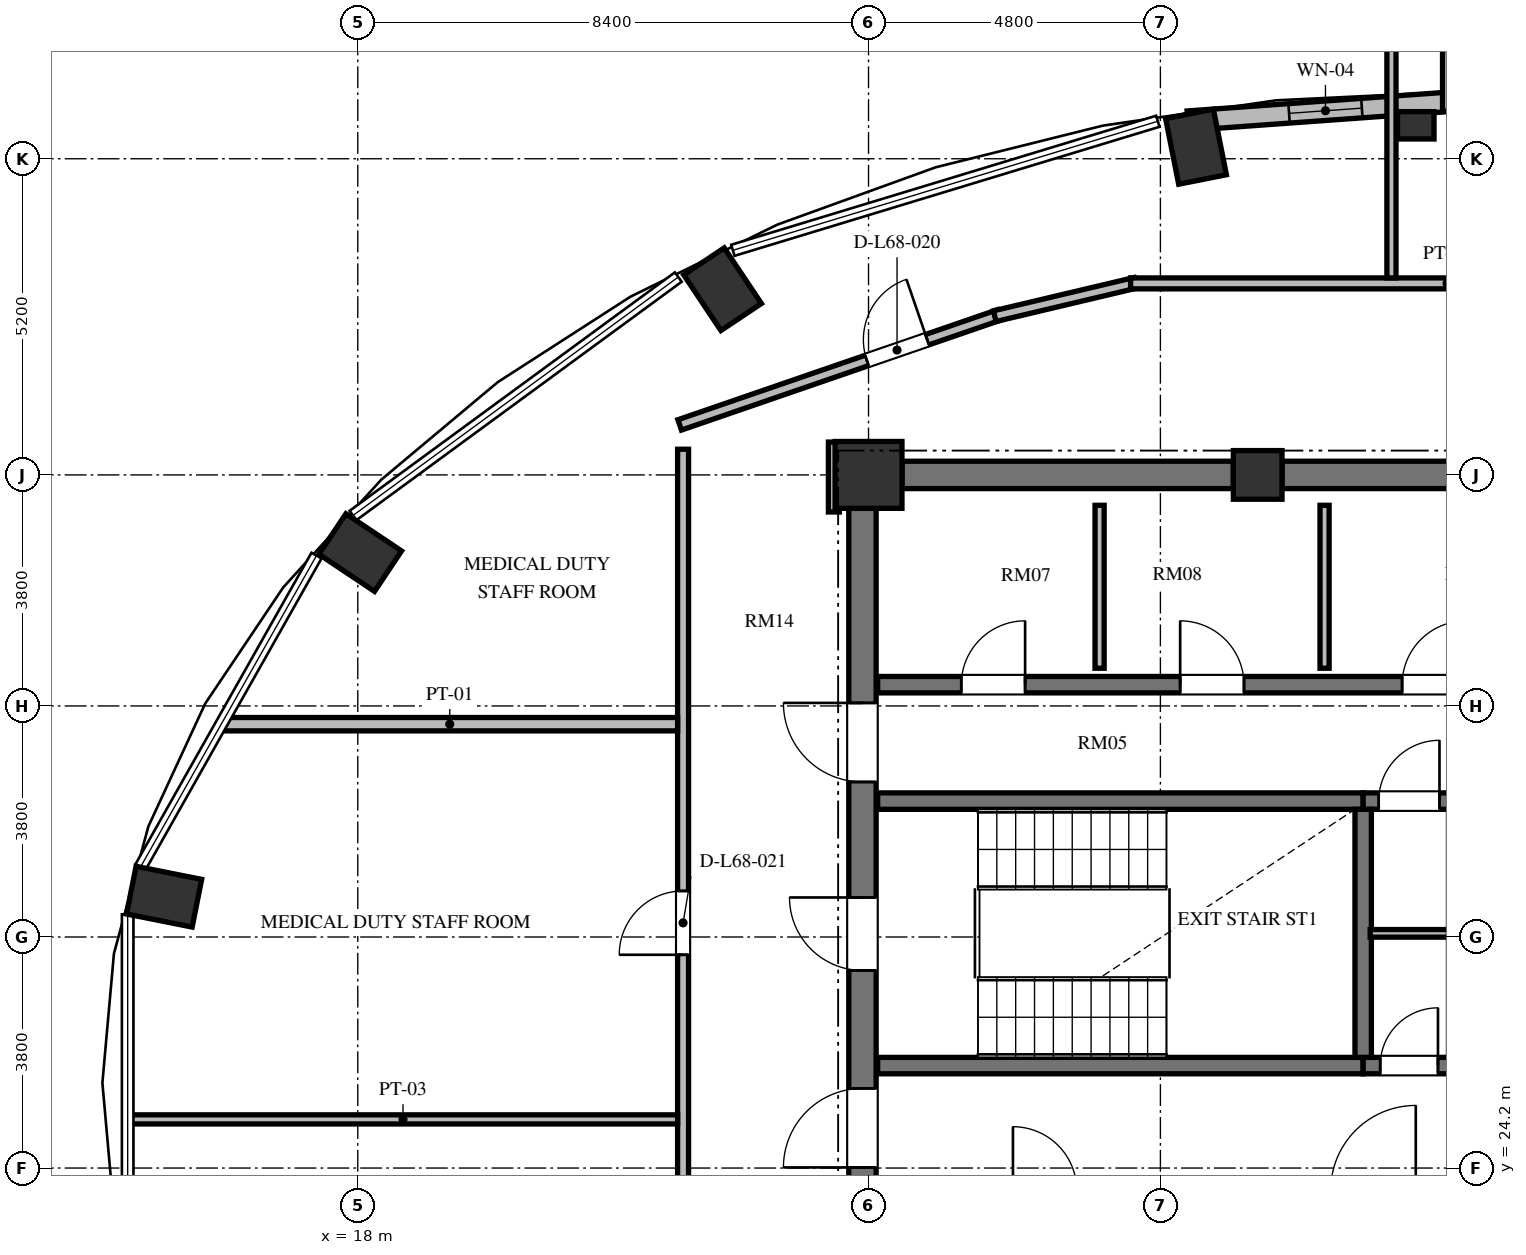
"""IFC4 building model, lengths in metres.
Left out: names, types, materials, properties, quantities, classifications, styles, units other than length and angle.
Written with IfcOpenShell. Run it as: python <this file> out.ifc"""

import sys

from ifc_helpers import new_model, si_unit, direction, frame, frame_2d, origin, origin_2d, place, context, subcontext, project, spatial, rectangle, extrude, element, fill, save


model = new_model("IFC4")
c1 = context("Model", 3, precision=1e-05, world=origin(), true_north=direction((0.0, 1.0)))
c2 = subcontext(c1, "Body", "Model", "MODEL_VIEW")
j1 = project(units=[si_unit("LENGTHUNIT", "METRE"), si_unit("PLANEANGLEUNIT", "RADIAN")], contexts=[c1])
p1 = place(None, origin())
s1 = spatial("IfcSite", under=j1, at=p1, CompositionType="ELEMENT")
p2 = place(p1, origin())
s2 = spatial("IfcBuilding", under=s1, at=p2, CompositionType="ELEMENT")
p3 = place(p2, frame((0.0, 0.0, 262.32)))
s3 = spatial("IfcBuildingStorey", under=s2, at=p3, CompositionType="ELEMENT", Elevation=262.32)
for number, where, z_axis, x_axis in (
    (1, (31.786, 40.998, 0.0), (0.0, 0.0, 1.0), (-0.195, 0.981, 0.0)),
    (2, (24.0, 38.654, 0.0), (0.0, 0.0, 1.0), (-0.556, 0.831, 0.0)),
    (3, (18.04, 34.323, 0.0), (0.0, 0.0, 1.0), (-0.831, 0.556, 0.0)),
    (4, (14.815, 28.663, 0.0), (0.0, 0.0, 1.0), (-0.981, 0.195, 0.0)),
):
    element("IfcColumn", number, at=place(p3, frame(where, z_axis=z_axis, x_axis=x_axis)), inside=s3, PredefinedType="COLUMN", context=c2, shape_type="SweptSolid", body=[
        extrude(rectangle(XDim=1.1, YDim=0.8, at=origin_2d()), origin(), (0.0, 0.0, 1.0), 3.648),
    ])
p4 = place(p3, frame((32.8, 35.6, 0.0), z_axis=(0.0, 0.0, 1.0), x_axis=(1.0, 0.0, 0.0)))
e5 = element("IfcColumn", 5, at=p4, inside=s3, PredefinedType="COLUMN", context=c2, shape_type="SweptSolid", body=[
    extrude(rectangle(XDim=0.8, YDim=0.8, at=origin_2d()), origin(), (0.0, 0.0, 1.0), 3.648),
])
p5 = place(p3, frame((26.4, 35.6, 0.0), z_axis=(0.0, 0.0, 1.0), x_axis=(1.0, 0.0, 0.0)))
e6 = element("IfcColumn", 6, at=p5, inside=s3, PredefinedType="COLUMN", context=c2, shape_type="SweptSolid", body=[
    extrude(rectangle(XDim=1.1, YDim=1.1, at=origin_2d()), origin(), (0.0, 0.0, 1.0), 3.648),
])
p6 = place(p3, frame((35.4, 41.35, 0.0), z_axis=(0.0, 0.0, 1.0), x_axis=(1.0, 0.0, 0.0)))
e7 = element("IfcColumn", 7, at=p6, inside=s3, PredefinedType="PILASTER", context=c2, shape_type="SweptSolid", body=[
    extrude(rectangle(XDim=0.6, YDim=0.45, at=origin_2d()), origin(), (0.0, 0.0, 1.0), 3.648),
])
p7 = place(p3, frame((26.3, 20.95, 0.0), z_axis=(0.0, 0.0, 1.0), x_axis=(0.0, 1.0, 0.0)))
e8 = element("IfcWall", 8, at=p7, inside=s3, PredefinedType="SHEAR", context=c2, shape_type="SweptSolid", body=[
    extrude(rectangle(XDim=14.1, YDim=0.45, at=frame_2d((7.05, 0.0))), origin(), (0.0, 0.0, 1.0), 3.648),
])
p8 = place(p7, frame((6.5, 0.0, 0.0)))
e9 = element("IfcOpeningElement", 9, at=p8, cuts=e8, PredefinedType="OPENING", context=c2, shape_type="SweptSolid", body=[
    extrude(rectangle(XDim=1.2, YDim=2.15, at=frame_2d((0.6, 1.075))), frame((0.0, 0.235, 0.0), z_axis=(0.0, -1.0, 0.0), x_axis=(1.0, 0.0, 0.0)), (0.0, 0.0, 1.0), 0.47),
])
p9 = place(p7, frame((9.6, 0.0, 0.0)))
e10 = element("IfcOpeningElement", 10, at=p9, cuts=e8, PredefinedType="OPENING", context=c2, shape_type="SweptSolid", body=[
    extrude(rectangle(XDim=1.3, YDim=2.2, at=frame_2d((0.65, 1.1))), frame((0.0, 0.235, 0.0), z_axis=(0.0, -1.0, 0.0), x_axis=(1.0, 0.0, 0.0)), (0.0, 0.0, 1.0), 0.47),
])
p10 = place(p7, frame((3.26, 0.0, 0.0)))
e11 = element("IfcOpeningElement", 11, at=p10, cuts=e8, PredefinedType="OPENING", context=c2, shape_type="SweptSolid", body=[
    extrude(rectangle(XDim=1.3, YDim=2.2, at=frame_2d((0.65, 1.1))), frame((0.0, 0.235, 0.0), z_axis=(0.0, -1.0, 0.0), x_axis=(1.0, 0.0, 0.0)), (0.0, 0.0, 1.0), 0.47),
])
p11 = place(p3, frame((26.95, 35.6, 0.0), z_axis=(0.0, 0.0, 1.0), x_axis=(1.0, 0.0, 0.0)))
e12 = element("IfcWall", 12, at=p11, inside=s3, PredefinedType="SHEAR", context=c2, shape_type="SweptSolid", body=[
    extrude(rectangle(XDim=5.45, YDim=0.45, at=frame_2d((2.725, 0.0))), origin(), (0.0, 0.0, 1.0), 3.648),
])
p12 = place(p3, frame((33.2, 35.6, 0.0), z_axis=(0.0, 0.0, 1.0), x_axis=(1.0, 0.0, 0.0)))
e13 = element("IfcWall", 13, at=p12, inside=s3, PredefinedType="SHEAR", context=c2, shape_type="SweptSolid", body=[
    extrude(rectangle(XDim=5.6, YDim=0.45, at=frame_2d((2.8, 0.0))), origin(), (0.0, 0.0, 1.0), 3.648),
])
p13 = place(p3, frame((36.179, 41.753, 0.0), z_axis=(0.0, 0.0, 1.0), x_axis=(-0.997408782787, -0.071942477163, 0.0)))
e14 = element("IfcWall", 14, at=p13, inside=s3, PredefinedType="SOLIDWALL", context=c2, shape_type="SweptSolid", body=[
    extrude(rectangle(XDim=4.541, YDim=0.32, at=frame_2d((2.27, 0.0))), origin(), (0.0, 0.0, 1.0), 3.448),
])
p14 = place(p13, frame((1.67, 0.0, 0.85)))
e15 = element("IfcOpeningElement", 15, at=p14, cuts=e14, PredefinedType="OPENING", context=c2, shape_type="SweptSolid", body=[
    extrude(rectangle(XDim=1.2, YDim=1.8, at=frame_2d((0.6, 0.9))), frame((0.0, 0.17, 0.0), z_axis=(0.0, -1.0, 0.0), x_axis=(1.0, 0.0, 0.0)), (0.0, 0.0, 1.0), 0.34),
])
p15 = place(p3, frame((36.0, 46.7, 0.0), z_axis=(0.0, 0.0, 1.0), x_axis=(0.0, -1.0, 0.0)))
e16 = element("IfcWall", 16, at=p15, inside=s3, PredefinedType="SOLIDWALL", context=c2, shape_type="SweptSolid", body=[
    extrude(rectangle(XDim=5.12, YDim=0.32, at=frame_2d((2.56, 0.0))), origin(), (0.0, 0.0, 1.0), 3.448),
])
p16 = place(p15, frame((1.36, 0.0, 0.84)))
e17 = element("IfcOpeningElement", 17, at=p16, cuts=e16, PredefinedType="OPENING", context=c2, shape_type="SweptSolid", body=[
    extrude(rectangle(XDim=2.4, YDim=2.04, at=frame_2d((1.2, 1.02))), frame((0.0, 0.17, 0.0), z_axis=(0.0, -1.0, 0.0), x_axis=(1.0, 0.0, 0.0)), (0.0, 0.0, 1.0), 0.34),
])
p17 = place(p3, frame((26.55, 30.235, 0.0), z_axis=(0.0, 0.0, 1.0), x_axis=(1.0, 0.0, 0.0)))
e18 = element("IfcWall", 18, at=p17, inside=s3, PredefinedType="SHEAR", context=c2, shape_type="SweptSolid", body=[
    extrude(rectangle(XDim=7.985, YDim=0.27, at=frame_2d((3.992, 0.0))), origin(), (0.0, 0.0, 1.0), 3.648),
])
p18 = place(p3, frame((34.535, 30.235, 0.0), z_axis=(0.0, 0.0, 1.0), x_axis=(1.0, 0.0, 0.0)))
e19 = element("IfcWall", 19, at=p18, inside=s3, PredefinedType="SHEAR", context=c2, shape_type="SweptSolid", body=[
    extrude(rectangle(XDim=2.93, YDim=0.27, at=frame_2d((1.465, 0.0))), origin(), (0.0, 0.0, 1.0), 3.648),
])
p19 = place(p18, frame((0.255, 0.0, 0.0)))
e20 = element("IfcOpeningElement", 20, at=p19, cuts=e19, PredefinedType="OPENING", context=c2, shape_type="SweptSolid", body=[
    extrude(rectangle(XDim=1.0, YDim=2.1, at=frame_2d((0.5, 1.05))), frame((0.0, 0.145, 0.0), z_axis=(0.0, -1.0, 0.0), x_axis=(1.0, 0.0, 0.0)), (0.0, 0.0, 1.0), 0.29),
])
p20 = place(p18, frame((1.7, 0.0, 0.0)))
e21 = element("IfcOpeningElement", 21, at=p20, cuts=e19, PredefinedType="OPENING", context=c2, shape_type="SweptSolid", body=[
    extrude(rectangle(XDim=0.95, YDim=2.1, at=frame_2d((0.475, 1.05))), frame((0.0, 0.145, 0.0), z_axis=(0.0, -1.0, 0.0), x_axis=(1.0, 0.0, 0.0)), (0.0, 0.0, 1.0), 0.29),
])
p21 = place(p3, frame((26.55, 25.885, 0.0), z_axis=(0.0, 0.0, 1.0), x_axis=(1.0, 0.0, 0.0)))
e22 = element("IfcWall", 22, at=p21, inside=s3, PredefinedType="SHEAR", context=c2, shape_type="SweptSolid", body=[
    extrude(rectangle(XDim=7.985, YDim=0.27, at=frame_2d((3.992, 0.0))), origin(), (0.0, 0.0, 1.0), 3.648),
])
p22 = place(p3, frame((34.535, 25.885, 0.0), z_axis=(0.0, 0.0, 1.0), x_axis=(1.0, 0.0, 0.0)))
e23 = element("IfcWall", 23, at=p22, inside=s3, PredefinedType="SHEAR", context=c2, shape_type="SweptSolid", body=[
    extrude(rectangle(XDim=2.93, YDim=0.27, at=frame_2d((1.465, 0.0))), origin(), (0.0, 0.0, 1.0), 3.648),
])
p23 = place(p22, frame((0.28, 0.0, 0.0)))
e24 = element("IfcOpeningElement", 24, at=p23, cuts=e23, PredefinedType="OPENING", context=c2, shape_type="SweptSolid", body=[
    extrude(rectangle(XDim=0.95, YDim=2.1, at=frame_2d((0.475, 1.05))), frame((0.0, 0.145, 0.0), z_axis=(0.0, -1.0, 0.0), x_axis=(1.0, 0.0, 0.0)), (0.0, 0.0, 1.0), 0.29),
])
p24 = place(p22, frame((1.7, 0.0, 0.0)))
e25 = element("IfcOpeningElement", 25, at=p24, cuts=e23, PredefinedType="OPENING", context=c2, shape_type="SweptSolid", body=[
    extrude(rectangle(XDim=0.95, YDim=2.1, at=frame_2d((0.475, 1.05))), frame((0.0, 0.145, 0.0), z_axis=(0.0, -1.0, 0.0), x_axis=(1.0, 0.0, 0.0)), (0.0, 0.0, 1.0), 0.29),
])
p25 = place(p3, frame((34.535, 26.02, 0.0), z_axis=(0.0, 0.0, 1.0), x_axis=(0.0, 1.0, 0.0)))
e26 = element("IfcWall", 26, at=p25, inside=s3, PredefinedType="SHEAR", context=c2, shape_type="SweptSolid", body=[
    extrude(rectangle(XDim=4.08, YDim=0.27, at=frame_2d((2.04, 0.0))), origin(), (0.0, 0.0, 1.0), 3.648),
])
p26 = place(p3, frame((34.65, 28.06, 0.0), z_axis=(0.0, 0.0, 1.0), x_axis=(1.0, 0.0, 0.0)))
e27 = element("IfcWall", 27, at=p26, inside=s3, PredefinedType="PARTITIONING", context=c2, shape_type="SweptSolid", body=[
    extrude(rectangle(XDim=2.7, YDim=0.125, at=frame_2d((1.35, 0.0))), origin(), (0.0, 0.0, 1.0), 3.448),
])
p27 = place(p3, frame((26.55, 32.15, 0.0), z_axis=(0.0, 0.0, 1.0), x_axis=(1.0, 0.0, 0.0)))
e28 = element("IfcWall", 28, at=p27, inside=s3, PredefinedType="SHEAR", context=c2, shape_type="SweptSolid", body=[
    extrude(rectangle(XDim=16.4, YDim=0.27, at=frame_2d((8.2, 0.0))), origin(), (0.0, 0.0, 1.0), 3.648),
])
p28 = place(p27, frame((1.375, 0.0, 0.0)))
e29 = element("IfcOpeningElement", 29, at=p28, cuts=e28, PredefinedType="OPENING", context=c2, shape_type="SweptSolid", body=[
    extrude(rectangle(XDim=1.05, YDim=2.15, at=frame_2d((0.525, 1.075))), frame((0.0, 0.145, 0.0), z_axis=(0.0, -1.0, 0.0), x_axis=(1.0, 0.0, 0.0)), (0.0, 0.0, 1.0), 0.29),
])
p29 = place(p27, frame((4.975, 0.0, 0.0)))
e30 = element("IfcOpeningElement", 30, at=p29, cuts=e28, PredefinedType="OPENING", context=c2, shape_type="SweptSolid", body=[
    extrude(rectangle(XDim=1.05, YDim=2.15, at=frame_2d((0.525, 1.075))), frame((0.0, 0.145, 0.0), z_axis=(0.0, -1.0, 0.0), x_axis=(1.0, 0.0, 0.0)), (0.0, 0.0, 1.0), 0.29),
])
p30 = place(p27, frame((8.625, 0.0, 0.0)))
e31 = element("IfcOpeningElement", 31, at=p30, cuts=e28, PredefinedType="OPENING", context=c2, shape_type="SweptSolid", body=[
    extrude(rectangle(XDim=1.05, YDim=2.15, at=frame_2d((0.525, 1.075))), frame((0.0, 0.145, 0.0), z_axis=(0.0, -1.0, 0.0), x_axis=(1.0, 0.0, 0.0)), (0.0, 0.0, 1.0), 0.29),
])
p31 = place(p27, frame((11.9, 0.0, 0.0)))
e32 = element("IfcOpeningElement", 32, at=p31, cuts=e28, PredefinedType="OPENING", context=c2, shape_type="SweptSolid", body=[
    extrude(rectangle(XDim=1.1, YDim=2.2, at=frame_2d((0.55, 1.1))), frame((0.0, 0.145, 0.0), z_axis=(0.0, -1.0, 0.0), x_axis=(1.0, 0.0, 0.0)), (0.0, 0.0, 1.0), 0.29),
])
p32 = place(p27, frame((14.5, 0.0, 0.0)))
e33 = element("IfcOpeningElement", 33, at=p32, cuts=e28, PredefinedType="OPENING", context=c2, shape_type="SweptSolid", body=[
    extrude(rectangle(XDim=1.1, YDim=2.2, at=frame_2d((0.55, 1.1))), frame((0.0, 0.145, 0.0), z_axis=(0.0, -1.0, 0.0), x_axis=(1.0, 0.0, 0.0)), (0.0, 0.0, 1.0), 0.29),
])
for number, where, z_axis, x_axis in (
    (34, (30.2, 32.42, 0.0), (0.0, 0.0, 1.0), (0.0, 1.0, 0.0)),
    (35, (33.9, 32.42, 0.0), (0.0, 0.0, 1.0), (0.0, 1.0, 0.0)),
):
    element("IfcWall", number, at=place(p3, frame(where, z_axis=z_axis, x_axis=x_axis)), inside=s3, PredefinedType="PARTITIONING", context=c2, shape_type="SweptSolid", body=[
        extrude(rectangle(XDim=2.68, YDim=0.15, at=frame_2d((1.34, 0.0))), origin(), (0.0, 0.0, 1.0), 3.448),
    ])
p33 = place(p3, frame((23.294, 36.422, 0.0), z_axis=(0.0, 0.0, 1.0), x_axis=(0.945493277461, 0.325641616316, 0.0)))
e36 = element("IfcWall", 36, at=p33, inside=s3, PredefinedType="PARTITIONING", context=c2, shape_type="SweptSolid", body=[
    extrude(rectangle(XDim=5.562, YDim=0.18, at=frame_2d((2.781, 0.0))), origin(), (0.0, 0.0, 1.0), 3.073),
])
p34 = place(p33, frame((3.256, 0.0, 0.0)))
e37 = element("IfcOpeningElement", 37, at=p34, cuts=e36, PredefinedType="OPENING", context=c2, shape_type="SweptSolid", body=[
    extrude(rectangle(XDim=1.05, YDim=2.15, at=frame_2d((0.525, 1.075))), frame((0.0, 0.1, 0.0), z_axis=(0.0, -1.0, 0.0), x_axis=(1.0, 0.0, 0.0)), (0.0, 0.0, 1.0), 0.2),
])
p35 = place(p3, frame((28.476, 38.211, 0.0), z_axis=(0.0, 0.0, 1.0), x_axis=(0.973030562203, 0.230676234189, 0.0)))
e38 = element("IfcWall", 38, at=p35, inside=s3, PredefinedType="PARTITIONING", context=c2, shape_type="SweptSolid", body=[
    extrude(rectangle(XDim=2.377, YDim=0.18, at=frame_2d((1.188, 0.0))), origin(), (0.0, 0.0, 1.0), 3.448),
])
p36 = place(p3, frame((30.71, 38.75, 0.0), z_axis=(0.0, 0.0, 1.0), x_axis=(1.0, 0.0, 0.0)))
e39 = element("IfcWall", 39, at=p36, inside=s3, PredefinedType="PARTITIONING", context=c2, shape_type="SweptSolid", body=[
    extrude(rectangle(XDim=20.815, YDim=0.18, at=frame_2d((10.408, 0.0))), origin(), (0.0, 0.0, 1.0), 3.073),
])
p37 = place(p36, frame((16.869, 0.0, 0.0)))
e40 = element("IfcOpeningElement", 40, at=p37, cuts=e39, PredefinedType="OPENING", context=c2, shape_type="SweptSolid", body=[
    extrude(rectangle(XDim=1.05, YDim=2.15, at=frame_2d((0.525, 1.075))), frame((0.0, 0.1, 0.0), z_axis=(0.0, -1.0, 0.0), x_axis=(1.0, 0.0, 0.0)), (0.0, 0.0, 1.0), 0.2),
])
p38 = place(p36, frame((8.765, 0.0, 0.0)))
e41 = element("IfcOpeningElement", 41, at=p38, cuts=e39, PredefinedType="OPENING", context=c2, shape_type="SweptSolid", body=[
    extrude(rectangle(XDim=1.05, YDim=2.15, at=frame_2d((0.525, 1.075))), frame((0.0, 0.1, 0.0), z_axis=(0.0, -1.0, 0.0), x_axis=(1.0, 0.0, 0.0)), (0.0, 0.0, 1.0), 0.2),
])
p39 = place(p3, frame((25.83, 36.14, 0.0), z_axis=(0.0, 0.0, 1.0), x_axis=(0.0, -1.0, 0.0)))
e42 = element("IfcWall", 42, at=p39, inside=s3, PredefinedType="PARTITIONING", context=c2, shape_type="SweptSolid", body=[
    extrude(rectangle(XDim=1.15, YDim=0.18, at=frame_2d((0.575, 0.0))), origin(), (0.0, 0.0, 1.0), 3.448),
])
p40 = place(p3, frame((23.35, 19.98, 0.0), z_axis=(0.0, 0.0, 1.0), x_axis=(0.0, 1.0, 0.0)))
e43 = element("IfcWall", 43, at=p40, inside=s3, PredefinedType="PARTITIONING", context=c2, shape_type="SweptSolid", body=[
    extrude(rectangle(XDim=16.042, YDim=0.18, at=frame_2d((8.021, 0.0))), origin(), (0.0, 0.0, 1.0), 3.448),
])
p41 = place(p40, frame((2.144, 0.0, 0.0)))
e44 = element("IfcOpeningElement", 44, at=p41, cuts=e43, PredefinedType="OPENING", context=c2, shape_type="SweptSolid", body=[
    extrude(rectangle(XDim=1.05, YDim=2.15, at=frame_2d((0.525, 1.075))), frame((0.0, 0.1, 0.0), z_axis=(0.0, -1.0, 0.0), x_axis=(1.0, 0.0, 0.0)), (0.0, 0.0, 1.0), 0.2),
])
p42 = place(p40, frame((7.728, 0.0, 0.0)))
e45 = element("IfcOpeningElement", 45, at=p42, cuts=e43, PredefinedType="OPENING", context=c2, shape_type="SweptSolid", body=[
    extrude(rectangle(XDim=1.05, YDim=2.15, at=frame_2d((0.525, 1.075))), frame((0.0, 0.1, 0.0), z_axis=(0.0, -1.0, 0.0), x_axis=(1.0, 0.0, 0.0)), (0.0, 0.0, 1.0), 0.2),
])
p43 = place(p3, frame((14.228, 25.0, 0.0), z_axis=(0.0, 0.0, 1.0), x_axis=(1.0, 0.0, 0.0)))
e46 = element("IfcWall", 46, at=p43, inside=s3, PredefinedType="PARTITIONING", context=c2, shape_type="SweptSolid", body=[
    extrude(rectangle(XDim=9.032, YDim=0.15, at=frame_2d((4.516, 0.0))), origin(), (0.0, 0.0, 1.0), 3.448),
])
p44 = place(p3, frame((15.765, 31.5, 0.0), z_axis=(0.0, 0.0, 1.0), x_axis=(1.0, 0.0, 0.0)))
e47 = element("IfcWall", 47, at=p44, inside=s3, PredefinedType="PARTITIONING", context=c2, shape_type="SweptSolid", body=[
    extrude(rectangle(XDim=7.495, YDim=0.22, at=frame_2d((3.748, 0.0))), origin(), (0.0, 0.0, 1.0), 3.448),
])
p45 = place(p3, frame((35.0, 38.84, 0.0), z_axis=(0.0, 0.0, 1.0), x_axis=(0.0, 1.0, 0.0)))
e48 = element("IfcWall", 48, at=p45, inside=s3, PredefinedType="PARTITIONING", context=c2, shape_type="SweptSolid", body=[
    extrude(rectangle(XDim=6.284, YDim=0.15, at=frame_2d((3.142, 0.0))), origin(), (0.0, 0.0, 1.0), 3.448),
])
p46 = place(p14, origin())
e49 = element("IfcWindow", 49, at=p46, inside=s3, PartitioningType="SINGLE_PANEL", PredefinedType="WINDOW", context=c2, shape_type="SweptSolid", body=[
    extrude(rectangle(XDim=1.2, YDim=1.8, at=frame_2d((0.6, 0.9))), frame((0.0, 0.03, 0.0), z_axis=(0.0, -1.0, 0.0), x_axis=(1.0, 0.0, 0.0)), (0.0, 0.0, 1.0), 0.06),
])
fill(e15, e49)
p47 = place(p8, origin())
e50 = element("IfcDoor", 50, at=p47, inside=s3, OperationType="SINGLE_SWING_RIGHT", PredefinedType="DOOR", context=c2, shape_type="SweptSolid", body=[
    extrude(rectangle(XDim=1.2, YDim=2.15, at=frame_2d((0.6, 1.075))), frame((0.0, 0.025, 0.0), z_axis=(0.0, -1.0, 0.0), x_axis=(1.0, 0.0, 0.0)), (0.0, 0.0, 1.0), 0.05),
])
fill(e9, e50)
p48 = place(p23, origin())
e51 = element("IfcDoor", 51, at=p48, inside=s3, OperationType="SINGLE_SWING_RIGHT", PredefinedType="DOOR", context=c2, shape_type="SweptSolid", body=[
    extrude(rectangle(XDim=0.95, YDim=2.1, at=frame_2d((0.475, 1.05))), frame((0.0, 0.025, 0.0), z_axis=(0.0, -1.0, 0.0), x_axis=(1.0, 0.0, 0.0)), (0.0, 0.0, 1.0), 0.05),
])
fill(e24, e51)
p49 = place(p19, origin())
e52 = element("IfcDoor", 52, at=p49, inside=s3, OperationType="SINGLE_SWING_RIGHT", PredefinedType="DOOR", context=c2, shape_type="SweptSolid", body=[
    extrude(rectangle(XDim=1.0, YDim=2.1, at=frame_2d((0.5, 1.05))), frame((0.0, 0.025, 0.0), z_axis=(0.0, -1.0, 0.0), x_axis=(1.0, 0.0, 0.0)), (0.0, 0.0, 1.0), 0.05),
])
fill(e20, e52)
p50 = place(p9, origin())
e53 = element("IfcDoor", 53, at=p50, inside=s3, OperationType="SINGLE_SWING_RIGHT", PredefinedType="DOOR", context=c2, shape_type="SweptSolid", body=[
    extrude(rectangle(XDim=1.3, YDim=2.2, at=frame_2d((0.65, 1.1))), frame((0.0, 0.025, 0.0), z_axis=(0.0, -1.0, 0.0), x_axis=(1.0, 0.0, 0.0)), (0.0, 0.0, 1.0), 0.05),
])
fill(e10, e53)
p51 = place(p10, origin())
e54 = element("IfcDoor", 54, at=p51, inside=s3, OperationType="SINGLE_SWING_LEFT", PredefinedType="DOOR", context=c2, shape_type="SweptSolid", body=[
    extrude(rectangle(XDim=1.3, YDim=2.2, at=frame_2d((0.65, 1.1))), frame((0.0, 0.025, 0.0), z_axis=(0.0, -1.0, 0.0), x_axis=(1.0, 0.0, 0.0)), (0.0, 0.0, 1.0), 0.05),
])
fill(e11, e54)
p52 = place(p28, origin())
e55 = element("IfcDoor", 55, at=p52, inside=s3, OperationType="SINGLE_SWING_RIGHT", PredefinedType="DOOR", context=c2, shape_type="SweptSolid", body=[
    extrude(rectangle(XDim=1.05, YDim=2.15, at=frame_2d((0.525, 1.075))), frame((0.0, 0.025, 0.0), z_axis=(0.0, -1.0, 0.0), x_axis=(1.0, 0.0, 0.0)), (0.0, 0.0, 1.0), 0.05),
])
fill(e29, e55)
p53 = place(p29, origin())
e56 = element("IfcDoor", 56, at=p53, inside=s3, OperationType="SINGLE_SWING_LEFT", PredefinedType="DOOR", context=c2, shape_type="SweptSolid", body=[
    extrude(rectangle(XDim=1.05, YDim=2.15, at=frame_2d((0.525, 1.075))), frame((0.0, 0.025, 0.0), z_axis=(0.0, -1.0, 0.0), x_axis=(1.0, 0.0, 0.0)), (0.0, 0.0, 1.0), 0.05),
])
fill(e30, e56)
p54 = place(p30, origin())
e57 = element("IfcDoor", 57, at=p54, inside=s3, OperationType="SINGLE_SWING_RIGHT", PredefinedType="DOOR", context=c2, shape_type="SweptSolid", body=[
    extrude(rectangle(XDim=1.05, YDim=2.15, at=frame_2d((0.525, 1.075))), frame((0.0, 0.025, 0.0), z_axis=(0.0, -1.0, 0.0), x_axis=(1.0, 0.0, 0.0)), (0.0, 0.0, 1.0), 0.05),
])
fill(e31, e57)
p55 = place(p34, origin())
e58 = element("IfcDoor", 58, at=p55, inside=s3, OperationType="SINGLE_SWING_RIGHT", PredefinedType="DOOR", context=c2, shape_type="SweptSolid", body=[
    extrude(rectangle(XDim=1.05, YDim=2.15, at=frame_2d((0.525, 1.075))), frame((0.0, 0.025, 0.0), z_axis=(0.0, -1.0, 0.0), x_axis=(1.0, 0.0, 0.0)), (0.0, 0.0, 1.0), 0.05),
])
fill(e37, e58)
p56 = place(p42, origin())
e59 = element("IfcDoor", 59, at=p56, inside=s3, OperationType="SINGLE_SWING_LEFT", PredefinedType="DOOR", context=c2, shape_type="SweptSolid", body=[
    extrude(rectangle(XDim=1.05, YDim=2.15, at=frame_2d((0.525, 1.075))), frame((0.0, 0.025, 0.0), z_axis=(0.0, -1.0, 0.0), x_axis=(1.0, 0.0, 0.0)), (0.0, 0.0, 1.0), 0.05),
])
fill(e45, e59)
save(model, sys.argv[1])
